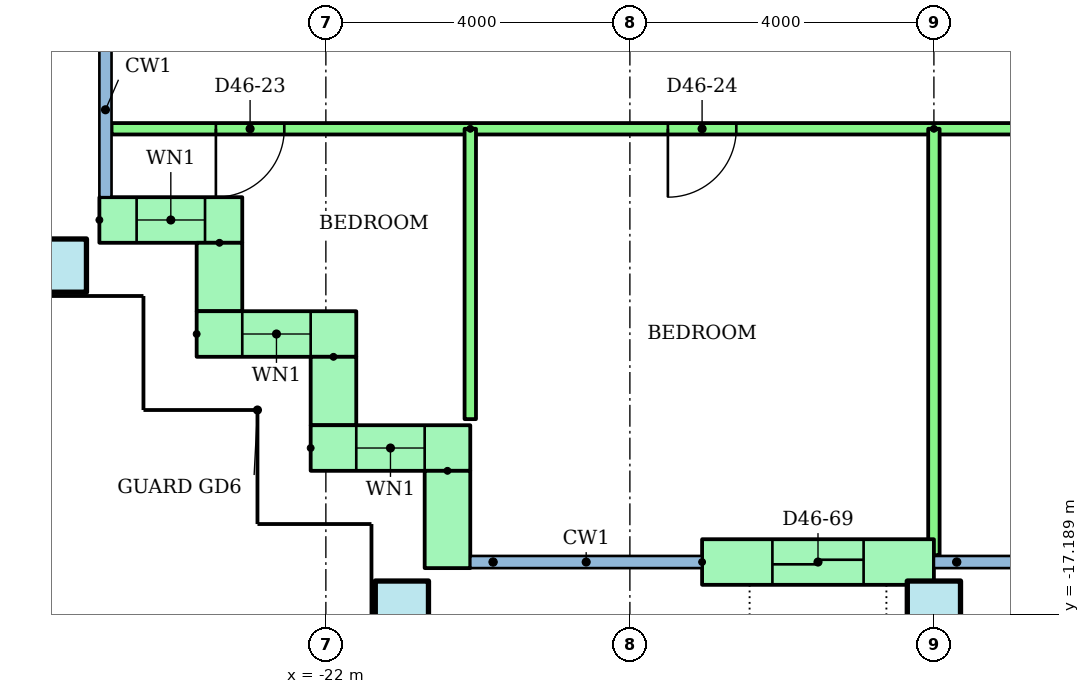
"""IFC4 building model, lengths in metres.
Left out: names, types, materials, properties, quantities, classifications, styles, units other than length and angle.
Written with IfcOpenShell. Run it as: python <this file> out.ifc"""

import sys

from ifc_helpers import new_model, si_unit, direction, frame, frame_2d, origin, origin_2d, place, context, subcontext, project, spatial, rectangle, hollow_rectangle, extrude, element, fill, save


model = new_model("IFC4")
c1 = context("Model", 3, precision=1e-05, world=origin(), true_north=direction((0.0, 1.0)))
c2 = subcontext(c1, "Body", "Model", "MODEL_VIEW")
j1 = project(units=[si_unit("LENGTHUNIT", "METRE"), si_unit("PLANEANGLEUNIT", "RADIAN")], contexts=[c1])
p1 = place(None, origin())
s1 = spatial("IfcSite", under=j1, at=p1, CompositionType="ELEMENT")
p2 = place(p1, origin())
s2 = spatial("IfcBuilding", under=s1, at=p2, CompositionType="ELEMENT")
p3 = place(p2, frame((0.0, 0.0, 178.1)))
s3 = spatial("IfcBuildingStorey", under=s2, at=p3, CompositionType="ELEMENT", Elevation=178.1)
for number, where in (
    (1, (-21.0, -17.1, 0.0)),
    (2, (-14.0, -17.1, 0.0)),
    (3, (-25.5, -12.6, 0.0)),
):
    element("IfcColumn", number, at=place(p3, frame(where)), inside=s3, PredefinedType="COLUMN", context=c2, shape_type="SweptSolid", body=[
        extrude(hollow_rectangle(XDim=0.7, YDim=0.7, WallThickness=0.036, at=origin_2d()), origin(), (0.0, 0.0, 1.0), 3.2),
    ])
p4 = place(p3, frame((-24.98, -12.0, 0.0)))
e4 = element("IfcWall", 4, at=p4, inside=s3, PredefinedType="STANDARD", context=c2, shape_type="SweptSolid", body=[
    extrude(rectangle(XDim=1.88, YDim=0.6, at=frame_2d((0.94, 0.0))), origin(), (0.0, 0.0, 1.0), 2.92),
])
p5 = place(p4, frame((0.49, 0.0, 0.9)))
e5 = element("IfcOpeningElement", 5, at=p5, cuts=e4, PredefinedType="OPENING", context=c2, shape_type="SweptSolid", body=[
    extrude(rectangle(XDim=0.9, YDim=1.5, at=frame_2d((0.45, 0.75))), frame((0.0, 0.31, 0.0), z_axis=(0.0, -1.0, 0.0), x_axis=(1.0, 0.0, 0.0)), (0.0, 0.0, 1.0), 0.62),
])
p6 = place(p3, frame((-23.4, -12.3, 0.0), z_axis=(0.0, 0.0, 1.0), x_axis=(0.0, -1.0, 0.0)))
e6 = element("IfcWall", 6, at=p6, inside=s3, PredefinedType="STANDARD", context=c2, shape_type="SweptSolid", body=[
    extrude(rectangle(XDim=0.9, YDim=0.6, at=frame_2d((0.45, 0.0))), origin(), (0.0, 0.0, 1.0), 2.92),
])
p7 = place(p3, frame((-23.7, -13.5, 0.0)))
e7 = element("IfcWall", 7, at=p7, inside=s3, PredefinedType="STANDARD", context=c2, shape_type="SweptSolid", body=[
    extrude(rectangle(XDim=2.1, YDim=0.6, at=frame_2d((1.05, 0.0))), origin(), (0.0, 0.0, 1.0), 2.92),
])
p8 = place(p7, frame((0.6, 0.0, 0.9)))
e8 = element("IfcOpeningElement", 8, at=p8, cuts=e7, PredefinedType="OPENING", context=c2, shape_type="SweptSolid", body=[
    extrude(rectangle(XDim=0.9, YDim=1.5, at=frame_2d((0.45, 0.75))), frame((0.0, 0.31, 0.0), z_axis=(0.0, -1.0, 0.0), x_axis=(1.0, 0.0, 0.0)), (0.0, 0.0, 1.0), 0.62),
])
p9 = place(p3, frame((-21.9, -13.8, 0.0), z_axis=(0.0, 0.0, 1.0), x_axis=(0.0, -1.0, 0.0)))
e9 = element("IfcWall", 9, at=p9, inside=s3, PredefinedType="STANDARD", context=c2, shape_type="SweptSolid", body=[
    extrude(rectangle(XDim=0.9, YDim=0.6, at=frame_2d((0.45, 0.0))), origin(), (0.0, 0.0, 1.0), 2.92),
])
p10 = place(p3, frame((-22.2, -15.0, 0.0)))
e10 = element("IfcWall", 10, at=p10, inside=s3, PredefinedType="STANDARD", context=c2, shape_type="SweptSolid", body=[
    extrude(rectangle(XDim=2.1, YDim=0.6, at=frame_2d((1.05, 0.0))), origin(), (0.0, 0.0, 1.0), 2.92),
])
p11 = place(p10, frame((0.6, 0.0, 0.9)))
e11 = element("IfcOpeningElement", 11, at=p11, cuts=e10, PredefinedType="OPENING", context=c2, shape_type="SweptSolid", body=[
    extrude(rectangle(XDim=0.9, YDim=1.5, at=frame_2d((0.45, 0.75))), frame((0.0, 0.31, 0.0), z_axis=(0.0, -1.0, 0.0), x_axis=(1.0, 0.0, 0.0)), (0.0, 0.0, 1.0), 0.62),
])
p12 = place(p3, frame((-20.4, -15.3, 0.0), z_axis=(0.0, 0.0, 1.0), x_axis=(0.0, -1.0, 0.0)))
e12 = element("IfcWall", 12, at=p12, inside=s3, PredefinedType="STANDARD", context=c2, shape_type="SweptSolid", body=[
    extrude(rectangle(XDim=1.28, YDim=0.6, at=frame_2d((0.64, 0.0))), origin(), (0.0, 0.0, 1.0), 2.92),
])
p13 = place(p3, frame((-17.05, -16.5, 0.0)))
e13 = element("IfcWall", 13, at=p13, inside=s3, PredefinedType="STANDARD", context=c2, shape_type="SweptSolid", body=[
    extrude(rectangle(XDim=3.05, YDim=0.6, at=frame_2d((1.525, 0.0))), origin(), (0.0, 0.0, 1.0), 2.92),
])
p14 = place(p13, frame((0.925, 0.0, 0.0)))
e14 = element("IfcOpeningElement", 14, at=p14, cuts=e13, PredefinedType="OPENING", context=c2, shape_type="SweptSolid", body=[
    extrude(rectangle(XDim=1.2, YDim=2.1, at=frame_2d((0.6, 1.05))), frame((0.0, 0.31, 0.0), z_axis=(0.0, -1.0, 0.0), x_axis=(1.0, 0.0, 0.0)), (0.0, 0.0, 1.0), 0.62),
])
p15 = place(p3, frame((2.0, -10.8, 0.0), z_axis=(0.0, 0.0, 1.0), x_axis=(-1.0, 0.0, 0.0)))
e15 = element("IfcWall", 15, at=p15, inside=s3, PredefinedType="PARTITIONING", context=c2, shape_type="SweptSolid", body=[
    extrude(rectangle(XDim=26.82, YDim=0.15, at=frame_2d((13.41, 0.0))), origin(), (0.0, 0.0, 1.0), 2.4),
])
p16 = place(p15, frame((24.547, 0.0, 0.0)))
e16 = element("IfcOpeningElement", 16, at=p16, cuts=e15, PredefinedType="OPENING", context=c2, shape_type="SweptSolid", body=[
    extrude(rectangle(XDim=0.9, YDim=2.1, at=frame_2d((0.45, 1.05))), frame((0.0, 0.085, 0.0), z_axis=(0.0, -1.0, 0.0), x_axis=(1.0, 0.0, 0.0)), (0.0, 0.0, 1.0), 0.17),
])
p17 = place(p15, frame((18.6, 0.0, 0.0)))
e17 = element("IfcOpeningElement", 17, at=p17, cuts=e15, PredefinedType="OPENING", context=c2, shape_type="SweptSolid", body=[
    extrude(rectangle(XDim=0.9, YDim=2.1, at=frame_2d((0.45, 1.05))), frame((0.0, 0.085, 0.0), z_axis=(0.0, -1.0, 0.0), x_axis=(1.0, 0.0, 0.0)), (0.0, 0.0, 1.0), 0.17),
])
p18 = place(p15, frame((11.5, 0.0, 0.0)))
e18 = element("IfcOpeningElement", 18, at=p18, cuts=e15, PredefinedType="OPENING", context=c2, shape_type="SweptSolid", body=[
    extrude(rectangle(XDim=1.0, YDim=2.1, at=frame_2d((0.5, 1.05))), frame((0.0, 0.085, 0.0), z_axis=(0.0, -1.0, 0.0), x_axis=(1.0, 0.0, 0.0)), (0.0, 0.0, 1.0), 0.17),
])
p19 = place(p15, frame((5.55, 0.0, 0.0)))
e19 = element("IfcOpeningElement", 19, at=p19, cuts=e15, PredefinedType="OPENING", context=c2, shape_type="SweptSolid", body=[
    extrude(rectangle(XDim=0.9, YDim=2.1, at=frame_2d((0.45, 1.05))), frame((0.0, 0.085, 0.0), z_axis=(0.0, -1.0, 0.0), x_axis=(1.0, 0.0, 0.0)), (0.0, 0.0, 1.0), 0.17),
])
p20 = place(p15, frame((1.55, 0.0, 0.0)))
e20 = element("IfcOpeningElement", 20, at=p20, cuts=e15, PredefinedType="OPENING", context=c2, shape_type="SweptSolid", body=[
    extrude(rectangle(XDim=0.9, YDim=2.1, at=frame_2d((0.45, 1.05))), frame((0.0, 0.085, 0.0), z_axis=(0.0, -1.0, 0.0), x_axis=(1.0, 0.0, 0.0)), (0.0, 0.0, 1.0), 0.17),
])
p21 = place(p3, frame((-20.1, -10.8, 0.0), z_axis=(0.0, 0.0, 1.0), x_axis=(0.0, -1.0, 0.0)))
e21 = element("IfcWall", 21, at=p21, inside=s3, PredefinedType="PARTITIONING", context=c2, shape_type="SweptSolid", body=[
    extrude(rectangle(XDim=3.82, YDim=0.15, at=frame_2d((1.91, 0.0))), origin(), (0.0, 0.0, 1.0), 2.4),
])
p22 = place(p3, frame((-14.0, -10.8, 0.0), z_axis=(0.0, 0.0, 1.0), x_axis=(0.0, -1.0, 0.0)))
e22 = element("IfcWall", 22, at=p22, inside=s3, PredefinedType="PARTITIONING", context=c2, shape_type="SweptSolid", body=[
    extrude(rectangle(XDim=5.61, YDim=0.15, at=frame_2d((2.805, 0.0))), origin(), (0.0, 0.0, 1.0), 2.4),
])
p23 = place(p5, origin())
e23 = element("IfcWindow", 23, at=p23, inside=s3, PartitioningType="SINGLE_PANEL", PredefinedType="WINDOW", context=c2, shape_type="SweptSolid", body=[
    extrude(rectangle(XDim=0.9, YDim=1.5, at=frame_2d((0.45, 0.75))), frame((0.0, 0.03, 0.0), z_axis=(0.0, -1.0, 0.0), x_axis=(1.0, 0.0, 0.0)), (0.0, 0.0, 1.0), 0.06),
])
fill(e5, e23)
p24 = place(p8, origin())
e24 = element("IfcWindow", 24, at=p24, inside=s3, PartitioningType="SINGLE_PANEL", PredefinedType="WINDOW", context=c2, shape_type="SweptSolid", body=[
    extrude(rectangle(XDim=0.9, YDim=1.5, at=frame_2d((0.45, 0.75))), frame((0.0, 0.03, 0.0), z_axis=(0.0, -1.0, 0.0), x_axis=(1.0, 0.0, 0.0)), (0.0, 0.0, 1.0), 0.06),
])
fill(e8, e24)
p25 = place(p11, origin())
e25 = element("IfcWindow", 25, at=p25, inside=s3, PartitioningType="SINGLE_PANEL", PredefinedType="WINDOW", context=c2, shape_type="SweptSolid", body=[
    extrude(rectangle(XDim=0.9, YDim=1.5, at=frame_2d((0.45, 0.75))), frame((0.0, 0.03, 0.0), z_axis=(0.0, -1.0, 0.0), x_axis=(1.0, 0.0, 0.0)), (0.0, 0.0, 1.0), 0.06),
])
fill(e11, e25)
p26 = place(p16, origin())
e26 = element("IfcDoor", 26, at=p26, inside=s3, OperationType="SINGLE_SWING_RIGHT", PredefinedType="DOOR", context=c2, shape_type="SweptSolid", body=[
    extrude(rectangle(XDim=0.9, YDim=2.1, at=frame_2d((0.45, 1.05))), frame((0.0, 0.025, 0.0), z_axis=(0.0, -1.0, 0.0), x_axis=(1.0, 0.0, 0.0)), (0.0, 0.0, 1.0), 0.05),
])
fill(e16, e26)
p27 = place(p17, origin())
e27 = element("IfcDoor", 27, at=p27, inside=s3, OperationType="SINGLE_SWING_RIGHT", PredefinedType="DOOR", context=c2, shape_type="SweptSolid", body=[
    extrude(rectangle(XDim=0.9, YDim=2.1, at=frame_2d((0.45, 1.05))), frame((0.0, 0.025, 0.0), z_axis=(0.0, -1.0, 0.0), x_axis=(1.0, 0.0, 0.0)), (0.0, 0.0, 1.0), 0.05),
])
fill(e17, e27)
p28 = place(p14, origin())
e28 = element("IfcDoor", 28, at=p28, inside=s3, OperationType="SLIDING_TO_LEFT", PredefinedType="DOOR", context=c2, shape_type="SweptSolid", body=[
    extrude(rectangle(XDim=1.2, YDim=2.1, at=frame_2d((0.6, 1.05))), frame((0.0, 0.025, 0.0), z_axis=(0.0, -1.0, 0.0), x_axis=(1.0, 0.0, 0.0)), (0.0, 0.0, 1.0), 0.05),
])
fill(e14, e28)
save(model, sys.argv[1])
